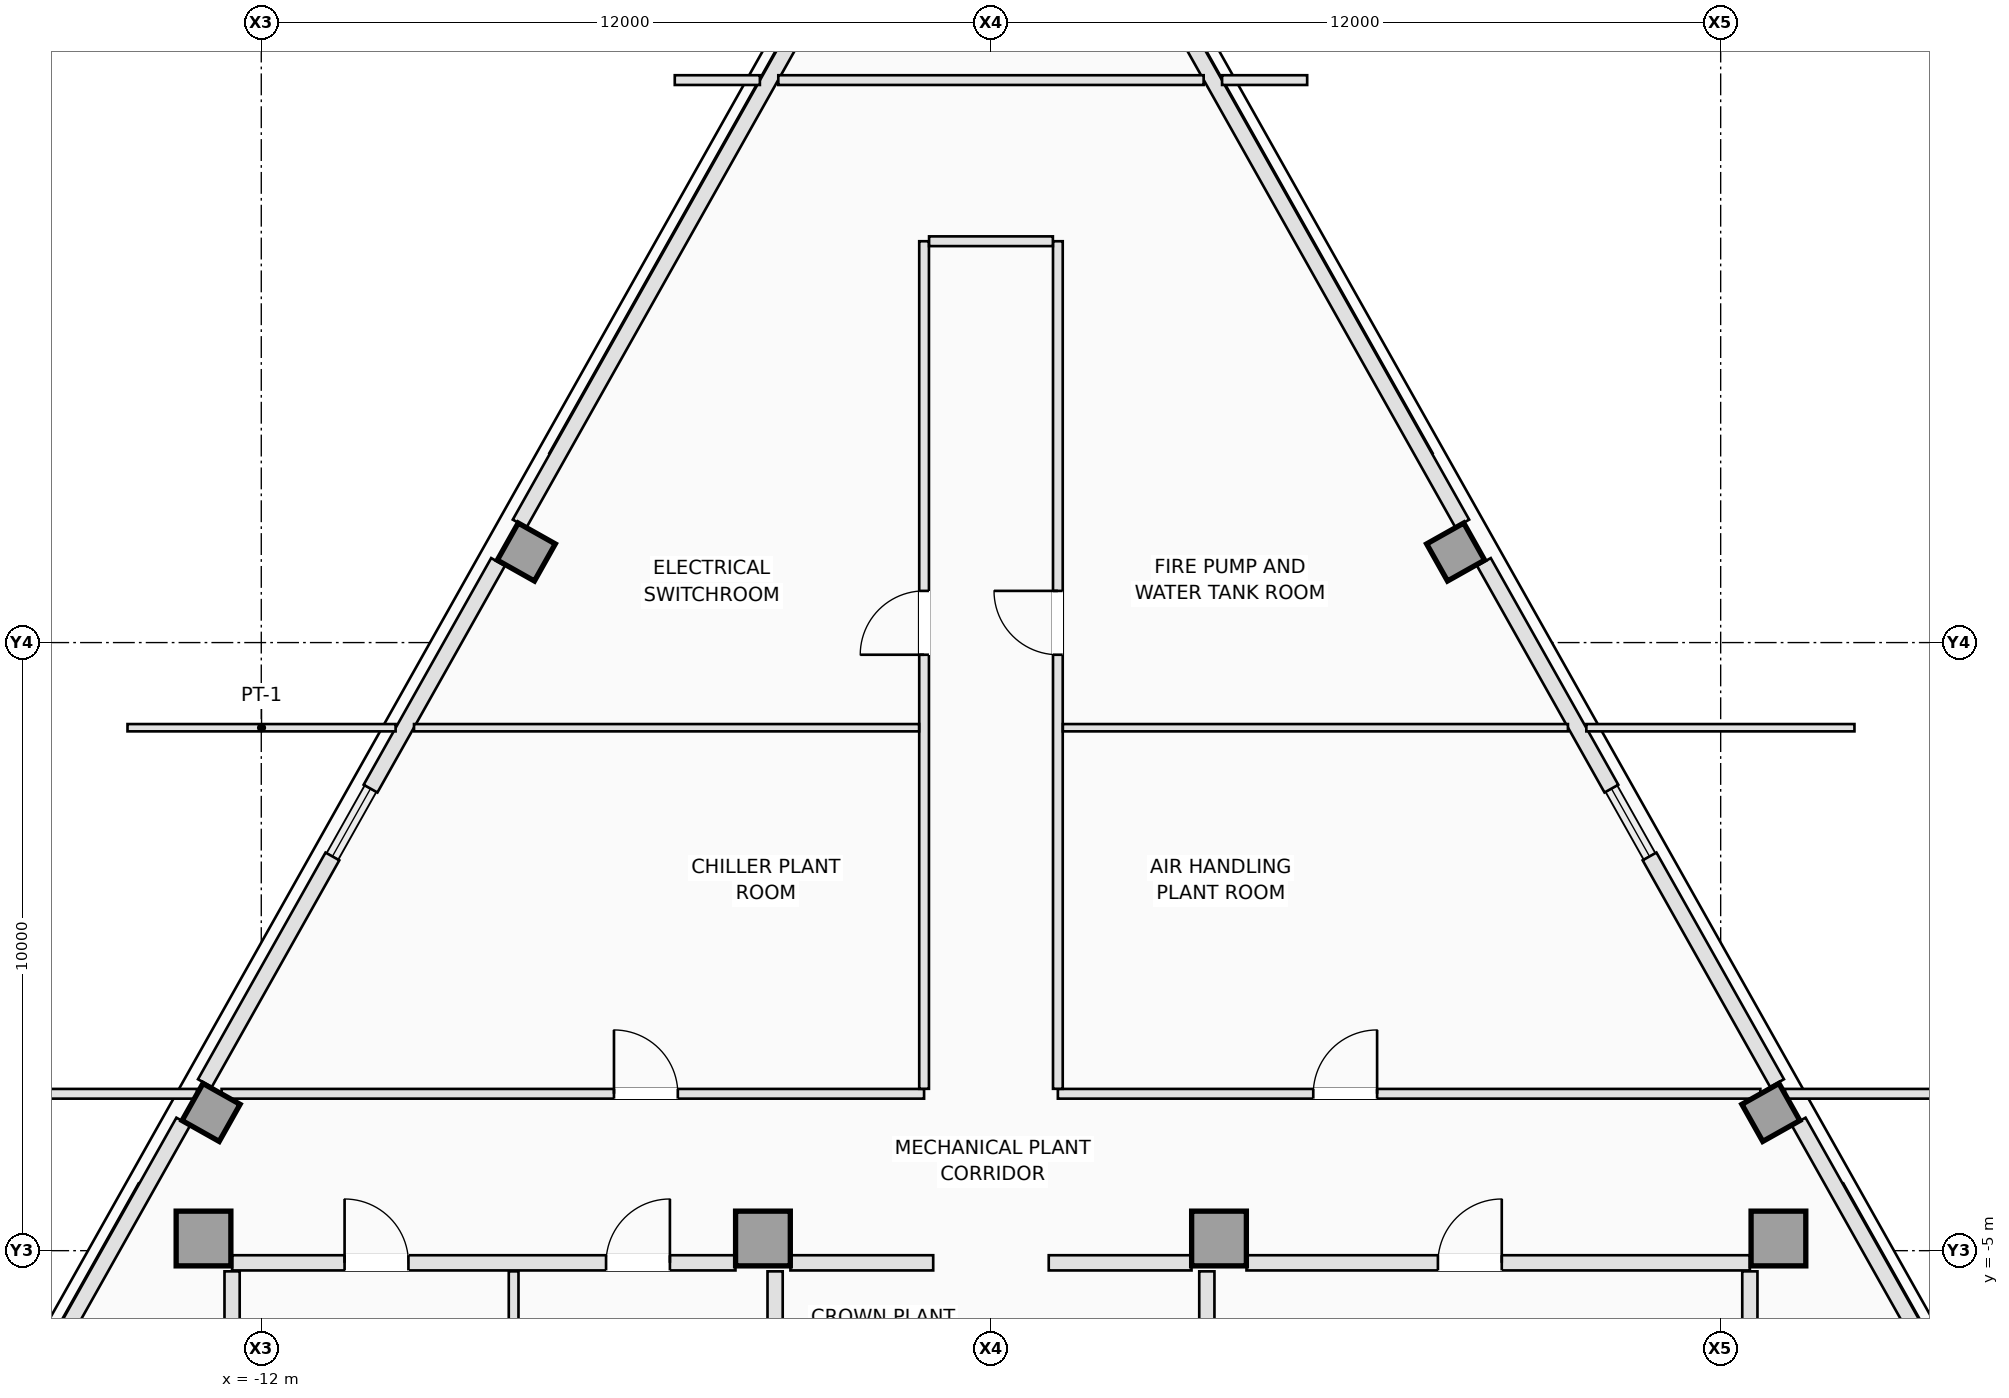
"""IFC4 building model, lengths in metres.
Left out: names, types, materials, properties, quantities, classifications, styles, units other than length and angle.
Written with IfcOpenShell. Run it as: python <this file> out.ifc"""

import sys

from ifc_helpers import new_model, si_unit, direction, frame, frame_2d, origin, origin_2d, place, context, subcontext, project, spatial, rectangle, extrude, element, fill, save


model = new_model("IFC4")
c1 = context("Model", 3, precision=1e-05, world=origin(), true_north=direction((0.0, 1.0)))
c2 = subcontext(c1, "Body", "Model", "MODEL_VIEW")
j1 = project(units=[si_unit("LENGTHUNIT", "METRE"), si_unit("PLANEANGLEUNIT", "RADIAN")], contexts=[c1])
p1 = place(None, origin())
s1 = spatial("IfcSite", under=j1, at=p1, CompositionType="ELEMENT")
p2 = place(p1, origin())
s2 = spatial("IfcBuilding", under=s1, at=p2, CompositionType="ELEMENT")
p3 = place(p2, frame((0.0, 0.0, 280.5)))
s3 = spatial("IfcBuildingStorey", under=s2, at=p3, CompositionType="ELEMENT", Elevation=280.5)
for number, where, z_axis, x_axis in (
    (1, (-12.95, -4.8, 0.0), (0.0, 0.0, 1.0), (1.0, 0.0, 0.0)),
    (2, (-3.75, -4.8, 0.0), (0.0, 0.0, 1.0), (1.0, 0.0, 0.0)),
    (3, (3.75, -4.8, 0.0), (0.0, 0.0, 1.0), (1.0, 0.0, 0.0)),
    (4, (12.95, -4.8, 0.0), (0.0, 0.0, 1.0), (1.0, 0.0, 0.0)),
):
    element("IfcColumn", number, at=place(p3, frame(where, z_axis=z_axis, x_axis=x_axis)), inside=s3, PredefinedType="COLUMN", context=c2, shape_type="SweptSolid", body=[
        extrude(rectangle(XDim=0.9, YDim=0.9, at=origin_2d()), origin(), (0.0, 0.0, 1.0), 3.2),
    ])
for number, where, z_axis, x_axis in (
    (5, (12.825, -2.727, 0.0), (0.0, 0.0, 1.0), (0.872, 0.49, 0.0)),
    (6, (7.642, 6.489, 0.0), (0.0, 0.0, 1.0), (0.872, 0.49, 0.0)),
    (7, (-7.642, 6.489, 0.0), (0.0, 0.0, 1.0), (-0.872, 0.49, 0.0)),
    (8, (-12.825, -2.727, 0.0), (0.0, 0.0, 1.0), (-0.872, 0.49, 0.0)),
):
    element("IfcColumn", number, at=place(p3, frame(where, z_axis=z_axis, x_axis=x_axis)), inside=s3, PredefinedType="COLUMN", context=c2, shape_type="SweptSolid", body=[
        extrude(rectangle(XDim=0.7, YDim=0.7, at=origin_2d()), origin(), (0.0, 0.0, 1.0), 3.2),
    ])
p4 = place(p3, frame((2.742, 15.863, 0.0), z_axis=(0.0, 0.0, 1.0), x_axis=(0.490260105081, -0.871576175309, 0.0)))
e9 = element("IfcWall", 9, at=p4, inside=s3, PredefinedType="STANDARD", context=c2, shape_type="SweptSolid", body=[
    extrude(rectangle(XDim=10.217, YDim=0.26, at=frame_2d((5.108, 0.0))), origin(), (0.0, 0.0, 1.0), 2.95),
])
p5 = place(p3, frame((13.283, -2.877, 0.0), z_axis=(0.0, 0.0, 1.0), x_axis=(0.490270316201, -0.871570431492, 0.0)))
e10 = element("IfcWall", 10, at=p5, inside=s3, PredefinedType="STANDARD", context=c2, shape_type="SweptSolid", body=[
    extrude(rectangle(XDim=10.216, YDim=0.26, at=frame_2d((5.108, 0.0))), origin(), (0.0, 0.0, 1.0), 2.95),
])
p6 = place(p3, frame((8.106, 6.326, 0.0), z_axis=(0.0, 0.0, 1.0), x_axis=(0.490244979871, -0.871584683041, 0.0)))
e11 = element("IfcWall", 11, at=p6, inside=s3, PredefinedType="STANDARD", context=c2, shape_type="SweptSolid", body=[
    extrude(rectangle(XDim=4.277, YDim=0.26, at=frame_2d((2.139, 0.0))), origin(), (0.0, 0.0, 1.0), 2.95),
])
p7 = place(p3, frame((10.83, 1.483, 0.0), z_axis=(0.0, 0.0, 1.0), x_axis=(0.490220591932, -0.871598400209, 0.0)))
e12 = element("IfcWall", 12, at=p7, inside=s3, PredefinedType="STANDARD", context=c2, shape_type="SweptSolid", body=[
    extrude(rectangle(XDim=4.278, YDim=0.26, at=frame_2d((2.139, 0.0))), origin(), (0.0, 0.0, 1.0), 2.95),
])
p8 = place(p3, frame((-18.292, -11.781, 0.0), z_axis=(0.0, 0.0, 1.0), x_axis=(0.490270316201, 0.871570431492, 0.0)))
e13 = element("IfcWall", 13, at=p8, inside=s3, PredefinedType="STANDARD", context=c2, shape_type="SweptSolid", body=[
    extrude(rectangle(XDim=10.216, YDim=0.26, at=frame_2d((5.108, 0.0))), origin(), (0.0, 0.0, 1.0), 2.95),
])
p9 = place(p3, frame((-7.751, 6.958, 0.0), z_axis=(0.0, 0.0, 1.0), x_axis=(0.490260105081, 0.871576175309, 0.0)))
e14 = element("IfcWall", 14, at=p9, inside=s3, PredefinedType="STANDARD", context=c2, shape_type="SweptSolid", body=[
    extrude(rectangle(XDim=10.217, YDim=0.26, at=frame_2d((5.108, 0.0))), origin(), (0.0, 0.0, 1.0), 2.95),
])
p10 = place(p3, frame((-12.927, -2.245, 0.0), z_axis=(0.0, 0.0, 1.0), x_axis=(0.490220591932, 0.871598400209, 0.0)))
e15 = element("IfcWall", 15, at=p10, inside=s3, PredefinedType="STANDARD", context=c2, shape_type="SweptSolid", body=[
    extrude(rectangle(XDim=4.278, YDim=0.26, at=frame_2d((2.139, 0.0))), origin(), (0.0, 0.0, 1.0), 2.95),
])
p11 = place(p3, frame((-10.203, 2.598, 0.0), z_axis=(0.0, 0.0, 1.0), x_axis=(0.490244979871, 0.871584683041, 0.0)))
e16 = element("IfcWall", 16, at=p11, inside=s3, PredefinedType="STANDARD", context=c2, shape_type="SweptSolid", body=[
    extrude(rectangle(XDim=4.277, YDim=0.26, at=frame_2d((2.139, 0.0))), origin(), (0.0, 0.0, 1.0), 2.95),
])
for number, where, z_axis, x_axis in (
    (17, (-12.48, -10.18, 0.0), (0.0, 0.0, 1.0), (0.0, 1.0, 0.0)),
    (18, (12.48, -10.18, 0.0), (0.0, 0.0, 1.0), (0.0, 1.0, 0.0)),
):
    element("IfcWall", number, at=place(p3, frame(where, z_axis=z_axis, x_axis=x_axis)), inside=s3, PredefinedType="PARTITIONING", context=c2, shape_type="SweptSolid", body=[
        extrude(rectangle(XDim=4.84, YDim=0.25, at=frame_2d((2.42, 0.0))), origin(), (0.0, 0.0, 1.0), 2.95),
    ])
p12 = place(p3, frame((-3.55, -15.898, 0.0), z_axis=(0.0, 0.0, 1.0), x_axis=(0.0, 1.0, 0.0)))
e19 = element("IfcWall", 19, at=p12, inside=s3, PredefinedType="PARTITIONING", context=c2, shape_type="SweptSolid", body=[
    extrude(rectangle(XDim=10.558, YDim=0.25, at=frame_2d((5.279, 0.0))), origin(), (0.0, 0.0, 1.0), 2.95),
])
p13 = place(p12, frame((6.198, 0.0, 0.0)))
e20 = element("IfcOpeningElement", 20, at=p13, cuts=e19, PredefinedType="OPENING", context=c2, shape_type="SweptSolid", body=[
    extrude(rectangle(XDim=1.0, YDim=2.15, at=frame_2d((0.5, 1.075))), frame((0.0, 0.135, 0.0), z_axis=(0.0, -1.0, 0.0), x_axis=(1.0, 0.0, 0.0)), (0.0, 0.0, 1.0), 0.27),
])
p14 = place(p3, frame((3.55, -15.898, 0.0), z_axis=(0.0, 0.0, 1.0), x_axis=(0.0, 1.0, 0.0)))
e21 = element("IfcWall", 21, at=p14, inside=s3, PredefinedType="PARTITIONING", context=c2, shape_type="SweptSolid", body=[
    extrude(rectangle(XDim=10.558, YDim=0.25, at=frame_2d((5.279, 0.0))), origin(), (0.0, 0.0, 1.0), 2.95),
])
p15 = place(p14, frame((6.198, 0.0, 0.0)))
e22 = element("IfcOpeningElement", 22, at=p15, cuts=e21, PredefinedType="OPENING", context=c2, shape_type="SweptSolid", body=[
    extrude(rectangle(XDim=1.0, YDim=2.15, at=frame_2d((0.5, 1.075))), frame((0.0, 0.135, 0.0), z_axis=(0.0, -1.0, 0.0), x_axis=(1.0, 0.0, 0.0)), (0.0, 0.0, 1.0), 0.27),
])
p16 = place(p3, frame((-12.48, -5.2, 0.0), z_axis=(0.0, 0.0, 1.0), x_axis=(1.0, 0.0, 0.0)))
e23 = element("IfcWall", 23, at=p16, inside=s3, PredefinedType="PARTITIONING", context=c2, shape_type="SweptSolid", body=[
    extrude(rectangle(XDim=8.278, YDim=0.25, at=frame_2d((4.139, 0.0))), origin(), (0.0, 0.0, 1.0), 2.95),
])
p17 = place(p16, frame((1.85, 0.0, 0.0)))
e24 = element("IfcOpeningElement", 24, at=p17, cuts=e23, PredefinedType="OPENING", context=c2, shape_type="SweptSolid", body=[
    extrude(rectangle(XDim=1.05, YDim=2.12, at=frame_2d((0.525, 1.06))), frame((0.0, 0.135, 0.0), z_axis=(0.0, -1.0, 0.0), x_axis=(1.0, 0.0, 0.0)), (0.0, 0.0, 1.0), 0.27),
])
p18 = place(p16, frame((6.15, 0.0, 0.0)))
e25 = element("IfcOpeningElement", 25, at=p18, cuts=e23, PredefinedType="OPENING", context=c2, shape_type="SweptSolid", body=[
    extrude(rectangle(XDim=1.05, YDim=2.12, at=frame_2d((0.525, 1.06))), frame((0.0, 0.135, 0.0), z_axis=(0.0, -1.0, 0.0), x_axis=(1.0, 0.0, 0.0)), (0.0, 0.0, 1.0), 0.27),
])
p19 = place(p3, frame((4.202, -5.2, 0.0), z_axis=(0.0, 0.0, 1.0), x_axis=(1.0, 0.0, 0.0)))
e26 = element("IfcWall", 26, at=p19, inside=s3, PredefinedType="PARTITIONING", context=c2, shape_type="SweptSolid", body=[
    extrude(rectangle(XDim=8.278, YDim=0.25, at=frame_2d((4.139, 0.0))), origin(), (0.0, 0.0, 1.0), 2.95),
])
p20 = place(p19, frame((3.148, 0.0, 0.0)))
e27 = element("IfcOpeningElement", 27, at=p20, cuts=e26, PredefinedType="OPENING", context=c2, shape_type="SweptSolid", body=[
    extrude(rectangle(XDim=1.05, YDim=2.12, at=frame_2d((0.525, 1.06))), frame((0.0, 0.135, 0.0), z_axis=(0.0, -1.0, 0.0), x_axis=(1.0, 0.0, 0.0)), (0.0, 0.0, 1.0), 0.27),
])
for number, where, z_axis, x_axis in (
    (28, (-3.298, -5.2, 0.0), (0.0, 0.0, 1.0), (1.0, 0.0, 0.0)),
    (29, (0.95, -5.2, 0.0), (0.0, 0.0, 1.0), (1.0, 0.0, 0.0)),
):
    element("IfcWall", number, at=place(p3, frame(where, z_axis=z_axis, x_axis=x_axis)), inside=s3, PredefinedType="PARTITIONING", context=c2, shape_type="SweptSolid", body=[
        extrude(rectangle(XDim=2.348, YDim=0.25, at=frame_2d((1.174, 0.0))), origin(), (0.0, 0.0, 1.0), 2.95),
    ])
p21 = place(p3, frame((-7.85, -8.073, 0.0), z_axis=(0.0, 0.0, 1.0), x_axis=(0.0, 1.0, 0.0)))
e30 = element("IfcWall", 30, at=p21, inside=s3, PredefinedType="PARTITIONING", context=c2, shape_type="SweptSolid", body=[
    extrude(rectangle(XDim=2.733, YDim=0.16, at=frame_2d((1.366, 0.0))), origin(), (0.0, 0.0, 1.0), 2.95),
])
p22 = place(p3, frame((-5.2, 14.25, 0.0), z_axis=(0.0, 0.0, 1.0), x_axis=(1.0, 0.0, 0.0)))
e31 = element("IfcWall", 31, at=p22, inside=s3, PredefinedType="PARTITIONING", context=c2, shape_type="SweptSolid", body=[
    extrude(rectangle(XDim=1.4, YDim=0.16, at=frame_2d((0.7, 0.0))), origin(), (0.0, 0.0, 1.0), 2.95),
])
p23 = place(p3, frame((-3.498, 14.25, 0.0), z_axis=(0.0, 0.0, 1.0), x_axis=(1.0, 0.0, 0.0)))
e32 = element("IfcWall", 32, at=p23, inside=s3, PredefinedType="PARTITIONING", context=c2, shape_type="SweptSolid", body=[
    extrude(rectangle(XDim=6.995, YDim=0.16, at=frame_2d((3.498, 0.0))), origin(), (0.0, 0.0, 1.0), 2.95),
])
p24 = place(p3, frame((3.8, 14.25, 0.0), z_axis=(0.0, 0.0, 1.0), x_axis=(1.0, 0.0, 0.0)))
e33 = element("IfcWall", 33, at=p24, inside=s3, PredefinedType="PARTITIONING", context=c2, shape_type="SweptSolid", body=[
    extrude(rectangle(XDim=1.4, YDim=0.16, at=frame_2d((0.7, 0.0))), origin(), (0.0, 0.0, 1.0), 2.95),
])
p25 = place(p3, frame((-15.8, -2.42, 0.0), z_axis=(0.0, 0.0, 1.0), x_axis=(1.0, 0.0, 0.0)))
e34 = element("IfcWall", 34, at=p25, inside=s3, PredefinedType="PARTITIONING", context=c2, shape_type="SweptSolid", body=[
    extrude(rectangle(XDim=2.743, YDim=0.16, at=frame_2d((1.372, 0.0))), origin(), (0.0, 0.0, 1.0), 2.95),
])
p26 = place(p3, frame((-12.653, -2.42, 0.0), z_axis=(0.0, 0.0, 1.0), x_axis=(1.0, 0.0, 0.0)))
e35 = element("IfcWall", 35, at=p26, inside=s3, PredefinedType="PARTITIONING", context=c2, shape_type="SweptSolid", body=[
    extrude(rectangle(XDim=11.553, YDim=0.16, at=frame_2d((5.776, 0.0))), origin(), (0.0, 0.0, 1.0), 2.95),
])
p27 = place(p26, frame((6.453, 0.0, 0.0)))
e36 = element("IfcOpeningElement", 36, at=p27, cuts=e35, PredefinedType="OPENING", context=c2, shape_type="SweptSolid", body=[
    extrude(rectangle(XDim=1.05, YDim=2.12, at=frame_2d((0.525, 1.06))), frame((0.0, 0.09, 0.0), z_axis=(0.0, -1.0, 0.0), x_axis=(1.0, 0.0, 0.0)), (0.0, 0.0, 1.0), 0.18),
])
p28 = place(p3, frame((1.1, -2.42, 0.0), z_axis=(0.0, 0.0, 1.0), x_axis=(1.0, 0.0, 0.0)))
e37 = element("IfcWall", 37, at=p28, inside=s3, PredefinedType="PARTITIONING", context=c2, shape_type="SweptSolid", body=[
    extrude(rectangle(XDim=11.553, YDim=0.16, at=frame_2d((5.776, 0.0))), origin(), (0.0, 0.0, 1.0), 2.95),
])
p29 = place(p28, frame((4.2, 0.0, 0.0)))
e38 = element("IfcOpeningElement", 38, at=p29, cuts=e37, PredefinedType="OPENING", context=c2, shape_type="SweptSolid", body=[
    extrude(rectangle(XDim=1.05, YDim=2.12, at=frame_2d((0.525, 1.06))), frame((0.0, 0.09, 0.0), z_axis=(0.0, -1.0, 0.0), x_axis=(1.0, 0.0, 0.0)), (0.0, 0.0, 1.0), 0.18),
])
p30 = place(p3, frame((13.057, -2.42, 0.0), z_axis=(0.0, 0.0, 1.0), x_axis=(1.0, 0.0, 0.0)))
e39 = element("IfcWall", 39, at=p30, inside=s3, PredefinedType="PARTITIONING", context=c2, shape_type="SweptSolid", body=[
    extrude(rectangle(XDim=2.743, YDim=0.16, at=frame_2d((1.372, 0.0))), origin(), (0.0, 0.0, 1.0), 2.95),
])
p31 = place(p3, frame((-1.1, -2.338, 0.0), z_axis=(0.0, 0.0, 1.0), x_axis=(0.0, 1.0, 0.0)))
e40 = element("IfcWall", 40, at=p31, inside=s3, PredefinedType="PARTITIONING", context=c2, shape_type="SweptSolid", body=[
    extrude(rectangle(XDim=13.938, YDim=0.16, at=frame_2d((6.969, 0.0))), origin(), (0.0, 0.0, 1.0), 2.95),
])
p32 = place(p31, frame((7.138, 0.0, 0.0)))
e41 = element("IfcOpeningElement", 41, at=p32, cuts=e40, PredefinedType="OPENING", context=c2, shape_type="SweptSolid", body=[
    extrude(rectangle(XDim=1.05, YDim=2.12, at=frame_2d((0.525, 1.06))), frame((0.0, 0.09, 0.0), z_axis=(0.0, -1.0, 0.0), x_axis=(1.0, 0.0, 0.0)), (0.0, 0.0, 1.0), 0.18),
])
p33 = place(p3, frame((1.1, -2.338, 0.0), z_axis=(0.0, 0.0, 1.0), x_axis=(0.0, 1.0, 0.0)))
e42 = element("IfcWall", 42, at=p33, inside=s3, PredefinedType="PARTITIONING", context=c2, shape_type="SweptSolid", body=[
    extrude(rectangle(XDim=13.938, YDim=0.16, at=frame_2d((6.969, 0.0))), origin(), (0.0, 0.0, 1.0), 2.95),
])
p34 = place(p33, frame((7.138, 0.0, 0.0)))
e43 = element("IfcOpeningElement", 43, at=p34, cuts=e42, PredefinedType="OPENING", context=c2, shape_type="SweptSolid", body=[
    extrude(rectangle(XDim=1.05, YDim=2.12, at=frame_2d((0.525, 1.06))), frame((0.0, 0.09, 0.0), z_axis=(0.0, -1.0, 0.0), x_axis=(1.0, 0.0, 0.0)), (0.0, 0.0, 1.0), 0.18),
])
p35 = place(p3, frame((-1.018, 11.6, 0.0), z_axis=(0.0, 0.0, 1.0), x_axis=(1.0, 0.0, 0.0)))
e44 = element("IfcWall", 44, at=p35, inside=s3, PredefinedType="PARTITIONING", context=c2, shape_type="SweptSolid", body=[
    extrude(rectangle(XDim=2.036, YDim=0.16, at=frame_2d((1.018, 0.0))), origin(), (0.0, 0.0, 1.0), 2.95),
])
p36 = place(p3, frame((-14.2, 3.6, 0.0), z_axis=(0.0, 0.0, 1.0), x_axis=(1.0, 0.0, 0.0)))
e45 = element("IfcWall", 45, at=p36, inside=s3, PredefinedType="PARTITIONING", context=c2, shape_type="SweptSolid", body=[
    extrude(rectangle(XDim=4.409, YDim=0.12, at=frame_2d((2.205, 0.0))), origin(), (0.0, 0.0, 1.0), 2.95),
])
for number, where, z_axis, x_axis in (
    (46, (-9.488, 3.6, 0.0), (0.0, 0.0, 1.0), (1.0, 0.0, 0.0)),
    (47, (1.182, 3.6, 0.0), (0.0, 0.0, 1.0), (1.0, 0.0, 0.0)),
):
    element("IfcWall", number, at=place(p3, frame(where, z_axis=z_axis, x_axis=x_axis)), inside=s3, PredefinedType="PARTITIONING", context=c2, shape_type="SweptSolid", body=[
        extrude(rectangle(XDim=8.306, YDim=0.12, at=frame_2d((4.153, 0.0))), origin(), (0.0, 0.0, 1.0), 2.95),
    ])
p37 = place(p3, frame((9.791, 3.6, 0.0), z_axis=(0.0, 0.0, 1.0), x_axis=(1.0, 0.0, 0.0)))
e48 = element("IfcWall", 48, at=p37, inside=s3, PredefinedType="PARTITIONING", context=c2, shape_type="SweptSolid", body=[
    extrude(rectangle(XDim=4.409, YDim=0.12, at=frame_2d((2.205, 0.0))), origin(), (0.0, 0.0, 1.0), 2.95),
])
p38 = place(p17, origin())
e49 = element("IfcDoor", 49, at=p38, inside=s3, OperationType="SINGLE_SWING_LEFT", PredefinedType="DOOR", context=c2, shape_type="SweptSolid", body=[
    extrude(rectangle(XDim=1.05, YDim=2.12, at=frame_2d((0.525, 1.06))), frame((0.0, 0.025, 0.0), z_axis=(0.0, -1.0, 0.0), x_axis=(1.0, 0.0, 0.0)), (0.0, 0.0, 1.0), 0.05),
])
fill(e24, e49)
p39 = place(p18, origin())
e50 = element("IfcDoor", 50, at=p39, inside=s3, OperationType="SINGLE_SWING_RIGHT", PredefinedType="DOOR", context=c2, shape_type="SweptSolid", body=[
    extrude(rectangle(XDim=1.05, YDim=2.12, at=frame_2d((0.525, 1.06))), frame((0.0, 0.025, 0.0), z_axis=(0.0, -1.0, 0.0), x_axis=(1.0, 0.0, 0.0)), (0.0, 0.0, 1.0), 0.05),
])
fill(e25, e50)
p40 = place(p20, origin())
e51 = element("IfcDoor", 51, at=p40, inside=s3, OperationType="SINGLE_SWING_RIGHT", PredefinedType="DOOR", context=c2, shape_type="SweptSolid", body=[
    extrude(rectangle(XDim=1.05, YDim=2.12, at=frame_2d((0.525, 1.06))), frame((0.0, 0.025, 0.0), z_axis=(0.0, -1.0, 0.0), x_axis=(1.0, 0.0, 0.0)), (0.0, 0.0, 1.0), 0.05),
])
fill(e27, e51)
p41 = place(p27, origin())
e52 = element("IfcDoor", 52, at=p41, inside=s3, OperationType="SINGLE_SWING_LEFT", PredefinedType="DOOR", context=c2, shape_type="SweptSolid", body=[
    extrude(rectangle(XDim=1.05, YDim=2.12, at=frame_2d((0.525, 1.06))), frame((0.0, 0.025, 0.0), z_axis=(0.0, -1.0, 0.0), x_axis=(1.0, 0.0, 0.0)), (0.0, 0.0, 1.0), 0.05),
])
fill(e36, e52)
p42 = place(p29, origin())
e53 = element("IfcDoor", 53, at=p42, inside=s3, OperationType="SINGLE_SWING_RIGHT", PredefinedType="DOOR", context=c2, shape_type="SweptSolid", body=[
    extrude(rectangle(XDim=1.05, YDim=2.12, at=frame_2d((0.525, 1.06))), frame((0.0, 0.025, 0.0), z_axis=(0.0, -1.0, 0.0), x_axis=(1.0, 0.0, 0.0)), (0.0, 0.0, 1.0), 0.05),
])
fill(e38, e53)
p43 = place(p32, origin())
e54 = element("IfcDoor", 54, at=p43, inside=s3, OperationType="SINGLE_SWING_LEFT", PredefinedType="DOOR", context=c2, shape_type="SweptSolid", body=[
    extrude(rectangle(XDim=1.05, YDim=2.12, at=frame_2d((0.525, 1.06))), frame((0.0, 0.025, 0.0), z_axis=(0.0, -1.0, 0.0), x_axis=(1.0, 0.0, 0.0)), (0.0, 0.0, 1.0), 0.05),
])
fill(e41, e54)
p44 = place(p34, origin())
e55 = element("IfcDoor", 55, at=p44, inside=s3, OperationType="SINGLE_SWING_RIGHT", PredefinedType="DOOR", context=c2, shape_type="SweptSolid", body=[
    extrude(rectangle(XDim=1.05, YDim=2.12, at=frame_2d((0.525, 1.06))), frame((0.0, 0.025, 0.0), z_axis=(0.0, -1.0, 0.0), x_axis=(1.0, 0.0, 0.0)), (0.0, 0.0, 1.0), 0.05),
])
fill(e43, e55)
save(model, sys.argv[1])
